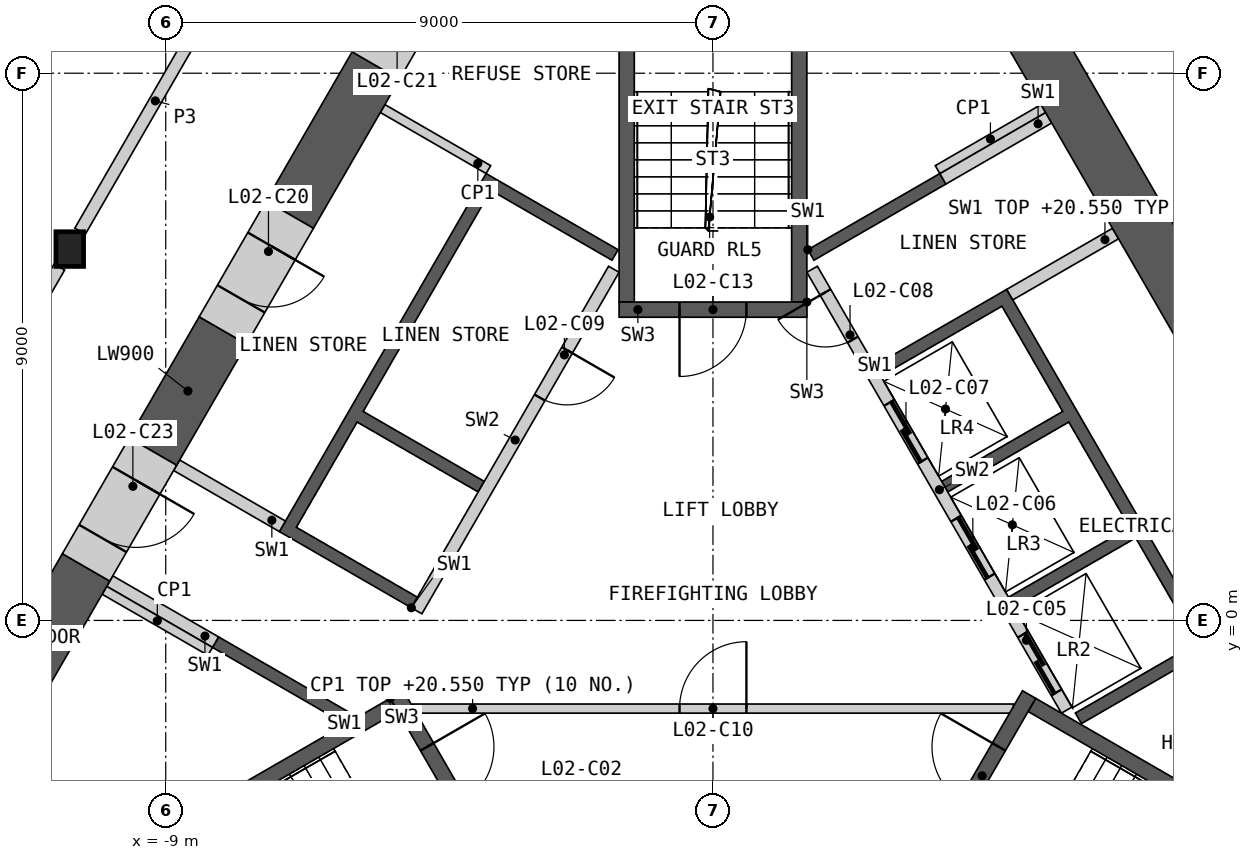
"""IFC4 building model, lengths in metres.
Left out: names, types, materials, properties, quantities, classifications, styles, units other than length and angle.
Written with IfcOpenShell. Run it as: python <this file> out.ifc"""

import sys

from ifc_helpers import new_model, si_unit, direction, frame, frame_2d, origin, origin_2d, place, context, subcontext, project, spatial, polyline, rectangle, i_section, outline, extrude, element, fill, save


model = new_model("IFC4")
c1 = context("Model", 3, precision=1e-05, world=origin(), true_north=direction((0.0, 1.0)))
c2 = subcontext(c1, "Body", "Model", "MODEL_VIEW")
j1 = project(units=[si_unit("LENGTHUNIT", "METRE"), si_unit("PLANEANGLEUNIT", "RADIAN")], contexts=[c1])
p1 = place(None, origin())
s1 = spatial("IfcSite", under=j1, at=p1, CompositionType="ELEMENT")
p2 = place(p1, origin())
s2 = spatial("IfcBuilding", under=s1, at=p2, CompositionType="ELEMENT")
p3 = place(p2, frame((0.0, 0.0, 15.5)))
s3 = spatial("IfcBuildingStorey", under=s2, at=p3, CompositionType="ELEMENT", Elevation=15.5)
p4 = place(p3, frame((-10.578, 6.107, 0.0), z_axis=(0.0, 0.0, 1.0), x_axis=(1.0, 0.0, 0.0)))
e1 = element("IfcColumn", 1, at=p4, inside=s3, PredefinedType="COLUMN", context=c2, shape_type="SweptSolid", body=[
    extrude(i_section(OverallWidth=0.454, OverallDepth=0.57, WebThickness=0.078, FlangeThickness=0.125, at=origin_2d()), origin(), (0.0, 0.0, 1.0), 5.5),
])
p5 = place(p3, origin())
e2 = element("IfcWall", 2, at=p5, inside=s3, PredefinedType="SHEAR", context=c2, shape_type="SweptSolid", body=[
    extrude(outline(polyline([(1.561, 6.097), (3.731, 7.35), (3.831, 7.177), (1.66, 5.924), (1.561, 6.097)])), origin(), (0.0, 0.0, 1.0), 5.05),
])
p6 = place(p3, origin())
e3 = element("IfcWall", 3, at=p6, inside=s3, PredefinedType="SHEAR", context=c2, shape_type="SweptSolid", body=[
    extrude(outline(polyline([(2.66, 4.192), (4.831, 5.445), (8.231, -0.444), (6.061, -1.697), (5.96, -1.524), (7.952, -0.374), (6.952, 1.358), (4.96, 0.208), (4.861, 0.381), (6.852, 1.531), (5.852, 3.263), (3.861, 2.113), (3.76, 2.287), (5.752, 3.437), (4.752, 5.169), (2.76, 4.019), (2.66, 4.192)])), origin(), (0.0, 0.0, 1.0), 5.05),
])
p7 = place(p3, frame((5.817, -1.476, 0.0), z_axis=(0.0, 0.0, 1.0), x_axis=(-0.500002616675, 0.866023893041, 0.0)))
e4 = element("IfcWall", 4, at=p7, inside=s3, PredefinedType="SOLIDWALL", context=c2, shape_type="SweptSolid", body=[
    extrude(rectangle(XDim=8.373, YDim=0.2, at=frame_2d((4.187, 0.0))), origin(), (0.0, 0.0, 1.0), 5.05),
])
p8 = place(p7, frame((0.337, 0.0, 0.0)))
e5 = element("IfcOpeningElement", 5, at=p8, cuts=e4, PredefinedType="OPENING", context=c2, shape_type="SweptSolid", body=[
    extrude(rectangle(XDim=1.1, YDim=2.1, at=frame_2d((0.55, 1.05))), frame((0.0, 0.11, 0.0), z_axis=(0.0, -1.0, 0.0), x_axis=(1.0, 0.0, 0.0)), (0.0, 0.0, 1.0), 0.22),
])
p9 = place(p7, frame((2.537, 0.0, 0.0)))
e6 = element("IfcOpeningElement", 6, at=p9, cuts=e4, PredefinedType="OPENING", context=c2, shape_type="SweptSolid", body=[
    extrude(rectangle(XDim=1.1, YDim=2.1, at=frame_2d((0.55, 1.05))), frame((0.0, 0.11, 0.0), z_axis=(0.0, -1.0, 0.0), x_axis=(1.0, 0.0, 0.0)), (0.0, 0.0, 1.0), 0.22),
])
p10 = place(p7, frame((4.737, 0.0, 0.0)))
e7 = element("IfcOpeningElement", 7, at=p10, cuts=e4, PredefinedType="OPENING", context=c2, shape_type="SweptSolid", body=[
    extrude(rectangle(XDim=1.1, YDim=2.1, at=frame_2d((0.55, 1.05))), frame((0.0, 0.11, 0.0), z_axis=(0.0, -1.0, 0.0), x_axis=(1.0, 0.0, 0.0)), (0.0, 0.0, 1.0), 0.22),
])
p11 = place(p7, frame((7.037, 0.0, 0.0)))
e8 = element("IfcOpeningElement", 8, at=p11, cuts=e4, PredefinedType="OPENING", context=c2, shape_type="SweptSolid", body=[
    extrude(rectangle(XDim=0.9, YDim=2.1, at=frame_2d((0.45, 1.05))), frame((0.0, 0.11, 0.0), z_axis=(0.0, -1.0, 0.0), x_axis=(1.0, 0.0, 0.0)), (0.0, 0.0, 1.0), 0.22),
])
p12 = place(p3, frame((4.881, 5.358, 0.0), z_axis=(0.0, 0.0, 1.0), x_axis=(0.866035824272, 0.499981950752, 0.0)))
e9 = element("IfcWall", 9, at=p12, inside=s3, PredefinedType="SHEAR", context=c2, shape_type="SweptSolid", body=[
    extrude(rectangle(XDim=2.009, YDim=0.2, at=frame_2d((1.004, 0.0))), origin(), (0.0, 0.0, 1.0), 5.05),
])
p13 = place(p3, frame((3.781, 7.263, 0.0), z_axis=(0.0, 0.0, 1.0), x_axis=(0.865983199114, 0.50007309351, 0.0)))
e10 = element("IfcWall", 10, at=p13, inside=s3, PredefinedType="SHEAR", context=c2, shape_type="SweptSolid", body=[
    extrude(rectangle(XDim=2.009, YDim=0.2, at=frame_2d((1.004, 0.0))), origin(), (0.0, 0.0, 1.0), 5.05),
])
p14 = place(p3, origin())
e11 = element("IfcWall", 11, at=p14, inside=s3, PredefinedType="SHEAR", context=c2, shape_type="SweptSolid", body=[
    extrude(outline(polyline([(-6.061, -1.697), (-8.231, -0.444), (-8.131, -0.271), (-5.96, -1.524), (-6.061, -1.697)])), origin(), (0.0, 0.0, 1.0), 5.05),
])
p15 = place(p3, origin())
e12 = element("IfcWall", 12, at=p15, inside=s3, PredefinedType="SHEAR", context=c2, shape_type="SweptSolid", body=[
    extrude(outline(polyline([(-4.96, 0.208), (-7.131, 1.461), (-3.731, 7.35), (-1.561, 6.097), (-1.66, 5.924), (-3.652, 7.074), (-5.752, 3.437), (-3.76, 2.287), (-3.861, 2.113), (-5.852, 3.263), (-6.852, 1.531), (-4.861, 0.381), (-4.96, 0.208)])), origin(), (0.0, 0.0, 1.0), 5.05),
])
p16 = place(p3, frame((-1.631, 5.776, 0.0), z_axis=(0.0, 0.0, 1.0), x_axis=(-0.499992876559, -0.866029516466, 0.0)))
e13 = element("IfcWall", 13, at=p16, inside=s3, PredefinedType="SOLIDWALL", context=c2, shape_type="SweptSolid", body=[
    extrude(rectangle(XDim=6.486, YDim=0.2, at=frame_2d((3.243, 0.0))), origin(), (0.0, 0.0, 1.0), 5.05),
])
p17 = place(p16, frame((1.537, 0.0, 0.0)))
e14 = element("IfcOpeningElement", 14, at=p17, cuts=e13, PredefinedType="OPENING", context=c2, shape_type="SweptSolid", body=[
    extrude(rectangle(XDim=0.9, YDim=2.1, at=frame_2d((0.45, 1.05))), frame((0.0, 0.11, 0.0), z_axis=(0.0, -1.0, 0.0), x_axis=(1.0, 0.0, 0.0)), (0.0, 0.0, 1.0), 0.22),
])
p18 = place(p3, frame((-7.081, 1.548, 0.0), z_axis=(0.0, 0.0, 1.0), x_axis=(-0.865983199114, 0.50007309351, 0.0)))
e15 = element("IfcWall", 15, at=p18, inside=s3, PredefinedType="SHEAR", context=c2, shape_type="SweptSolid", body=[
    extrude(rectangle(XDim=2.009, YDim=0.2, at=frame_2d((1.004, 0.0))), origin(), (0.0, 0.0, 1.0), 5.05),
])
p19 = place(p3, frame((-8.181, -0.357, 0.0), z_axis=(0.0, 0.0, 1.0), x_axis=(-0.866035824272, 0.499981950752, 0.0)))
e16 = element("IfcWall", 16, at=p19, inside=s3, PredefinedType="SHEAR", context=c2, shape_type="SweptSolid", body=[
    extrude(rectangle(XDim=2.009, YDim=0.2, at=frame_2d((1.004, 0.0))), origin(), (0.0, 0.0, 1.0), 5.05),
])
p20 = place(p3, frame((-4.941, -1.45, 0.0), z_axis=(0.0, 0.0, 1.0), x_axis=(1.0, 0.0, 0.0)))
e17 = element("IfcWall", 17, at=p20, inside=s3, PredefinedType="PARTITIONING", context=c2, shape_type="SweptSolid", body=[
    extrude(rectangle(XDim=9.882, YDim=0.15, at=frame_2d((4.941, 0.0))), origin(), (0.0, 0.0, 1.0), 5.05),
])
p21 = place(p20, frame((4.391, 0.0, 0.0)))
e18 = element("IfcOpeningElement", 18, at=p21, cuts=e17, PredefinedType="OPENING", context=c2, shape_type="SweptSolid", body=[
    extrude(rectangle(XDim=1.1, YDim=2.1, at=frame_2d((0.55, 1.05))), frame((0.0, 0.085, 0.0), z_axis=(0.0, -1.0, 0.0), x_axis=(1.0, 0.0, 0.0)), (0.0, 0.0, 1.0), 0.17),
])
p22 = place(p3, origin())
e19 = element("IfcWall", 19, at=p22, inside=s3, PredefinedType="SHEAR", context=c2, shape_type="SweptSolid", body=[
    extrude(outline(polyline([(-5.307, -1.281), (-10.374, -4.206), (-10.032, -4.298), (-5.182, -1.498), (-5.307, -1.281)])), origin(), (0.0, 0.0, 1.0), 5.05),
])
p23 = place(p3, frame((-5.199, -1.219, 0.0), z_axis=(0.0, 0.0, 1.0), x_axis=(0.499982516597, -0.866035497597, 0.0)))
e20 = element("IfcWall", 20, at=p23, inside=s3, PredefinedType="SHEAR", context=c2, shape_type="SweptSolid", body=[
    extrude(rectangle(XDim=3.088, YDim=0.25, at=frame_2d((1.544, 0.0))), origin(), (0.0, 0.0, 1.0), 5.05),
])
p24 = place(p23, frame((0.994, 0.0, 0.0)))
e21 = element("IfcOpeningElement", 21, at=p24, cuts=e20, PredefinedType="OPENING", context=c2, shape_type="SweptSolid", body=[
    extrude(rectangle(XDim=1.1, YDim=2.1, at=frame_2d((0.55, 1.05))), frame((0.0, 0.135, 0.0), z_axis=(0.0, -1.0, 0.0), x_axis=(1.0, 0.0, 0.0)), (0.0, 0.0, 1.0), 0.27),
])
p25 = place(p3, origin())
e22 = element("IfcWall", 22, at=p25, inside=s3, PredefinedType="SHEAR", context=c2, shape_type="SweptSolid", body=[
    extrude(outline(polyline([(10.032, -4.298), (10.374, -4.206), (5.307, -1.281), (5.182, -1.498), (10.032, -4.298)])), origin(), (0.0, 0.0, 1.0), 5.05),
])
p26 = place(p3, frame((3.655, -3.893, 0.0), z_axis=(0.0, 0.0, 1.0), x_axis=(0.499982516597, 0.866035497597, 0.0)))
e23 = element("IfcWall", 23, at=p26, inside=s3, PredefinedType="SHEAR", context=c2, shape_type="SweptSolid", body=[
    extrude(rectangle(XDim=3.088, YDim=0.25, at=frame_2d((1.544, 0.0))), origin(), (0.0, 0.0, 1.0), 5.05),
])
p27 = place(p26, frame((0.994, 0.0, 0.0)))
e24 = element("IfcOpeningElement", 24, at=p27, cuts=e23, PredefinedType="OPENING", context=c2, shape_type="SweptSolid", body=[
    extrude(rectangle(XDim=1.1, YDim=2.1, at=frame_2d((0.55, 1.05))), frame((0.0, 0.135, 0.0), z_axis=(0.0, -1.0, 0.0), x_axis=(1.0, 0.0, 0.0)), (0.0, 0.0, 1.0), 0.27),
])
p28 = place(p3, origin())
e25 = element("IfcWall", 25, at=p28, inside=s3, PredefinedType="SHEAR", context=c2, shape_type="SweptSolid", body=[
    extrude(outline(polyline([(1.544, 5.237), (1.544, 11.087), (1.294, 10.837), (1.294, 5.237), (1.544, 5.237)])), origin(), (0.0, 0.0, 1.0), 5.05),
])
p29 = place(p3, origin())
e26 = element("IfcWall", 26, at=p29, inside=s3, PredefinedType="SHEAR", context=c2, shape_type="SweptSolid", body=[
    extrude(outline(polyline([(-1.294, 10.837), (-1.544, 11.087), (-1.544, 5.237), (-1.294, 5.237), (-1.294, 10.837)])), origin(), (0.0, 0.0, 1.0), 5.05),
])
p30 = place(p3, frame((1.544, 5.112, 0.0), z_axis=(0.0, 0.0, 1.0), x_axis=(-1.0, 0.0, 0.0)))
e27 = element("IfcWall", 27, at=p30, inside=s3, PredefinedType="SHEAR", context=c2, shape_type="SweptSolid", body=[
    extrude(rectangle(XDim=3.088, YDim=0.25, at=frame_2d((1.544, 0.0))), origin(), (0.0, 0.0, 1.0), 5.05),
])
p31 = place(p30, frame((0.994, 0.0, 0.0)))
e28 = element("IfcOpeningElement", 28, at=p31, cuts=e27, PredefinedType="OPENING", context=c2, shape_type="SweptSolid", body=[
    extrude(rectangle(XDim=1.1, YDim=2.1, at=frame_2d((0.55, 1.05))), frame((0.0, 0.135, 0.0), z_axis=(0.0, -1.0, 0.0), x_axis=(1.0, 0.0, 0.0)), (0.0, 0.0, 1.0), 0.27),
])
for number, where, z_axis, x_axis in (
    (29, (3.693, 7.415, 0.0), (0.0, 0.0, 1.0), (0.866, 0.5, 0.0)),
    (30, (-8.268, -0.509, 0.0), (0.0, 0.0, 1.0), (-0.866, 0.5, 0.0)),
    (31, (-3.693, 7.415, 0.0), (0.0, 0.0, 1.0), (-0.866, 0.5, 0.0)),
):
    element("IfcWall", number, at=place(p3, frame(where, z_axis=z_axis, x_axis=x_axis)), inside=s3, PredefinedType="PARTITIONING", context=c2, shape_type="SweptSolid", body=[
        extrude(rectangle(XDim=2.009, YDim=0.15, at=frame_2d((1.004, 0.0))), origin(), (0.0, 0.0, 1.0), 5.05),
    ])
p32 = place(p3, frame((8.16, 4.596, 0.0), z_axis=(0.0, 0.0, 1.0), x_axis=(-0.500011374349, 0.866018836701, 0.0)))
e32 = element("IfcWall", 32, at=p32, inside=s3, PredefinedType="SHEAR", context=c2, shape_type="SweptSolid", body=[
    extrude(rectangle(XDim=9.046, YDim=0.9, at=frame_2d((4.523, 0.0))), origin(), (0.0, 0.0, 1.0), 5.05),
])
p33 = place(p3, frame((-10.31, 0.872, 0.0), z_axis=(0.0, 0.0, 1.0), x_axis=(-0.499968858743, -0.866043382451, 0.0)))
e33 = element("IfcWall", 33, at=p33, inside=s3, PredefinedType="SHEAR", context=c2, shape_type="SweptSolid", body=[
    extrude(rectangle(XDim=4.546, YDim=0.9, at=frame_2d((2.273, 0.0))), origin(), (0.0, 0.0, 1.0), 5.05),
])
p34 = place(p3, frame((-5.545, 9.126, 0.0), z_axis=(0.0, 0.0, 1.0), x_axis=(-0.499978737809, -0.866037679168, 0.0)))
e34 = element("IfcWall", 34, at=p34, inside=s3, PredefinedType="SHEAR", context=c2, shape_type="SweptSolid", body=[
    extrude(rectangle(XDim=2.831, YDim=0.9, at=frame_2d((1.416, 0.0))), origin(), (0.0, 0.0, 1.0), 5.05),
])
p35 = place(p3, frame((-8.06, 4.769, 0.0), z_axis=(0.0, 0.0, 1.0), x_axis=(-0.499952165731, -0.866053019151, 0.0)))
e35 = element("IfcWall", 35, at=p35, inside=s3, PredefinedType="SHEAR", context=c2, shape_type="SweptSolid", body=[
    extrude(rectangle(XDim=2.3, YDim=0.9, at=frame_2d((1.15, 0.0))), origin(), (0.0, 0.0, 1.0), 5.05),
])
p36 = place(p3, frame((-6.96, 6.674, 0.0), z_axis=(0.0, 0.0, 1.0), x_axis=(-0.50002983664, -0.866008176907, 0.0)))
e36 = element("IfcWall", 36, at=p36, inside=s3, PredefinedType="SHEAR", context=c2, shape_type="SweptSolid", body=[
    extrude(rectangle(XDim=2.2, YDim=0.9, at=frame_2d((1.1, 0.0))), origin(), (0.0, 0.0, 1.0), 5.05),
])
p37 = place(p36, frame((0.6, 0.0, 0.0)))
e37 = element("IfcOpeningElement", 37, at=p37, cuts=e36, PredefinedType="OPENING", context=c2, shape_type="SweptSolid", body=[
    extrude(rectangle(XDim=1.0, YDim=2.1, at=frame_2d((0.5, 1.05))), frame((0.0, 0.46, 0.0), z_axis=(0.0, -1.0, 0.0), x_axis=(1.0, 0.0, 0.0)), (0.0, 0.0, 1.0), 0.92),
])
p38 = place(p3, frame((-4.445, 11.031, 0.0), z_axis=(0.0, 0.0, 1.0), x_axis=(-0.50002983664, -0.866008176907, 0.0)))
e38 = element("IfcWall", 38, at=p38, inside=s3, PredefinedType="SHEAR", context=c2, shape_type="SweptSolid", body=[
    extrude(rectangle(XDim=2.2, YDim=0.9, at=frame_2d((1.1, 0.0))), origin(), (0.0, 0.0, 1.0), 5.05),
])
p39 = place(p38, frame((0.6, 0.0, 0.0)))
e39 = element("IfcOpeningElement", 39, at=p39, cuts=e38, PredefinedType="OPENING", context=c2, shape_type="SweptSolid", body=[
    extrude(rectangle(XDim=1.0, YDim=2.1, at=frame_2d((0.5, 1.05))), frame((0.0, 0.46, 0.0), z_axis=(0.0, -1.0, 0.0), x_axis=(1.0, 0.0, 0.0)), (0.0, 0.0, 1.0), 0.92),
])
p40 = place(p3, frame((-9.21, 2.777, 0.0), z_axis=(0.0, 0.0, 1.0), x_axis=(-0.500077893725, -0.86598042715, 0.0)))
e40 = element("IfcWall", 40, at=p40, inside=s3, PredefinedType="SHEAR", context=c2, shape_type="SweptSolid", body=[
    extrude(rectangle(XDim=2.2, YDim=0.9, at=frame_2d((1.1, 0.0))), origin(), (0.0, 0.0, 1.0), 5.05),
])
p41 = place(p40, frame((0.55, 0.0, 0.0)))
e41 = element("IfcOpeningElement", 41, at=p41, cuts=e40, PredefinedType="OPENING", context=c2, shape_type="SweptSolid", body=[
    extrude(rectangle(XDim=1.1, YDim=2.1, at=frame_2d((0.55, 1.05))), frame((0.0, 0.46, 0.0), z_axis=(0.0, -1.0, 0.0), x_axis=(1.0, 0.0, 0.0)), (0.0, 0.0, 1.0), 0.92),
])
p42 = place(p3, frame((-10.408, 6.402, 0.0), z_axis=(0.0, 0.0, 1.0), x_axis=(0.499985793049, 0.866033606016, 0.0)))
e42 = element("IfcWall", 42, at=p42, inside=s3, PredefinedType="PARTITIONING", context=c2, shape_type="SweptSolid", body=[
    extrude(rectangle(XDim=9.898, YDim=0.2, at=frame_2d((4.949, 0.0))), origin(), (0.0, 0.0, 1.0), 5.05),
])
p43 = place(p3, frame((-15.634, -2.648, 0.0), z_axis=(0.0, 0.0, 1.0), x_axis=(0.500017363087, 0.866015378969, 0.0)))
e43 = element("IfcWall", 43, at=p43, inside=s3, PredefinedType="PARTITIONING", context=c2, shape_type="SweptSolid", body=[
    extrude(rectangle(XDim=9.77, YDim=0.2, at=frame_2d((4.885, 0.0))), origin(), (0.0, 0.0, 1.0), 5.05),
])
p44 = place(p43, frame((4.086, 0.0, 0.0)))
e44 = element("IfcOpeningElement", 44, at=p44, cuts=e43, PredefinedType="OPENING", context=c2, shape_type="SweptSolid", body=[
    extrude(rectangle(XDim=1.8, YDim=2.1, at=frame_2d((0.9, 1.05))), frame((0.0, 0.11, 0.0), z_axis=(0.0, -1.0, 0.0), x_axis=(1.0, 0.0, 0.0)), (0.0, 0.0, 1.0), 0.22),
])
p45 = place(p3, frame((5.573, 14.776, 0.0), z_axis=(0.0, 0.0, 1.0), x_axis=(0.499986904098, -0.866032964575, 0.0)))
e45 = element("IfcWall", 45, at=p45, inside=s3, PredefinedType="PARTITIONING", context=c2, shape_type="SweptSolid", body=[
    extrude(rectangle(XDim=9.67, YDim=0.2, at=frame_2d((4.835, 0.0))), origin(), (0.0, 0.0, 1.0), 5.05),
])
p46 = place(p45, frame((3.985, 0.0, 0.0)))
e46 = element("IfcOpeningElement", 46, at=p46, cuts=e45, PredefinedType="OPENING", context=c2, shape_type="SweptSolid", body=[
    extrude(rectangle(XDim=1.8, YDim=2.1, at=frame_2d((0.9, 1.05))), frame((0.0, 0.11, 0.0), z_axis=(0.0, -1.0, 0.0), x_axis=(1.0, 0.0, 0.0)), (0.0, 0.0, 1.0), 0.22),
])
p47 = place(p8, origin())
e47 = element("IfcDoor", 47, at=p47, inside=s3, OperationType="SLIDING_TO_LEFT", PredefinedType="DOOR", context=c2, shape_type="SweptSolid", body=[
    extrude(rectangle(XDim=1.1, YDim=2.1, at=frame_2d((0.55, 1.05))), frame((0.0, 0.025, 0.0), z_axis=(0.0, -1.0, 0.0), x_axis=(1.0, 0.0, 0.0)), (0.0, 0.0, 1.0), 0.05),
])
fill(e5, e47)
p48 = place(p9, origin())
e48 = element("IfcDoor", 48, at=p48, inside=s3, OperationType="SLIDING_TO_LEFT", PredefinedType="DOOR", context=c2, shape_type="SweptSolid", body=[
    extrude(rectangle(XDim=1.1, YDim=2.1, at=frame_2d((0.55, 1.05))), frame((0.0, 0.025, 0.0), z_axis=(0.0, -1.0, 0.0), x_axis=(1.0, 0.0, 0.0)), (0.0, 0.0, 1.0), 0.05),
])
fill(e6, e48)
p49 = place(p10, origin())
e49 = element("IfcDoor", 49, at=p49, inside=s3, OperationType="SLIDING_TO_LEFT", PredefinedType="DOOR", context=c2, shape_type="SweptSolid", body=[
    extrude(rectangle(XDim=1.1, YDim=2.1, at=frame_2d((0.55, 1.05))), frame((0.0, 0.025, 0.0), z_axis=(0.0, -1.0, 0.0), x_axis=(1.0, 0.0, 0.0)), (0.0, 0.0, 1.0), 0.05),
])
fill(e7, e49)
p50 = place(p11, origin())
e50 = element("IfcDoor", 50, at=p50, inside=s3, OperationType="SINGLE_SWING_RIGHT", PredefinedType="DOOR", context=c2, shape_type="SweptSolid", body=[
    extrude(rectangle(XDim=0.9, YDim=2.1, at=frame_2d((0.45, 1.05))), frame((0.0, 0.025, 0.0), z_axis=(0.0, -1.0, 0.0), x_axis=(1.0, 0.0, 0.0)), (0.0, 0.0, 1.0), 0.05),
])
fill(e8, e50)
p51 = place(p17, origin())
e51 = element("IfcDoor", 51, at=p51, inside=s3, OperationType="SINGLE_SWING_LEFT", PredefinedType="DOOR", context=c2, shape_type="SweptSolid", body=[
    extrude(rectangle(XDim=0.9, YDim=2.1, at=frame_2d((0.45, 1.05))), frame((0.0, 0.025, 0.0), z_axis=(0.0, -1.0, 0.0), x_axis=(1.0, 0.0, 0.0)), (0.0, 0.0, 1.0), 0.05),
])
fill(e14, e51)
p52 = place(p21, origin())
e52 = element("IfcDoor", 52, at=p52, inside=s3, OperationType="SINGLE_SWING_RIGHT", PredefinedType="DOOR", context=c2, shape_type="SweptSolid", body=[
    extrude(rectangle(XDim=1.1, YDim=2.1, at=frame_2d((0.55, 1.05))), frame((0.0, 0.025, 0.0), z_axis=(0.0, -1.0, 0.0), x_axis=(1.0, 0.0, 0.0)), (0.0, 0.0, 1.0), 0.05),
])
fill(e18, e52)
p53 = place(p24, origin())
e53 = element("IfcDoor", 53, at=p53, inside=s3, OperationType="SINGLE_SWING_LEFT", PredefinedType="DOOR", context=c2, shape_type="SweptSolid", body=[
    extrude(rectangle(XDim=1.1, YDim=2.1, at=frame_2d((0.55, 1.05))), frame((0.0, 0.025, 0.0), z_axis=(0.0, -1.0, 0.0), x_axis=(1.0, 0.0, 0.0)), (0.0, 0.0, 1.0), 0.05),
])
fill(e21, e53)
p54 = place(p27, origin())
e54 = element("IfcDoor", 54, at=p54, inside=s3, OperationType="SINGLE_SWING_RIGHT", PredefinedType="DOOR", context=c2, shape_type="SweptSolid", body=[
    extrude(rectangle(XDim=1.1, YDim=2.1, at=frame_2d((0.55, 1.05))), frame((0.0, 0.025, 0.0), z_axis=(0.0, -1.0, 0.0), x_axis=(1.0, 0.0, 0.0)), (0.0, 0.0, 1.0), 0.05),
])
fill(e24, e54)
p55 = place(p31, origin())
e55 = element("IfcDoor", 55, at=p55, inside=s3, OperationType="SINGLE_SWING_RIGHT", PredefinedType="DOOR", context=c2, shape_type="SweptSolid", body=[
    extrude(rectangle(XDim=1.1, YDim=2.1, at=frame_2d((0.55, 1.05))), frame((0.0, 0.025, 0.0), z_axis=(0.0, -1.0, 0.0), x_axis=(1.0, 0.0, 0.0)), (0.0, 0.0, 1.0), 0.05),
])
fill(e28, e55)
p56 = place(p37, origin())
e56 = element("IfcDoor", 56, at=p56, inside=s3, OperationType="SINGLE_SWING_LEFT", PredefinedType="DOOR", context=c2, shape_type="SweptSolid", body=[
    extrude(rectangle(XDim=1.0, YDim=2.1, at=frame_2d((0.5, 1.05))), frame((0.0, 0.205, 0.0), z_axis=(0.0, -1.0, 0.0), x_axis=(1.0, 0.0, 0.0)), (0.0, 0.0, 1.0), 0.05),
])
fill(e37, e56)
p57 = place(p41, origin())
e57 = element("IfcDoor", 57, at=p57, inside=s3, OperationType="SINGLE_SWING_LEFT", PredefinedType="DOOR", context=c2, shape_type="SweptSolid", body=[
    extrude(rectangle(XDim=1.1, YDim=2.1, at=frame_2d((0.55, 1.05))), frame((0.0, 0.205, 0.0), z_axis=(0.0, -1.0, 0.0), x_axis=(1.0, 0.0, 0.0)), (0.0, 0.0, 1.0), 0.05),
])
fill(e41, e57)
save(model, sys.argv[1])
